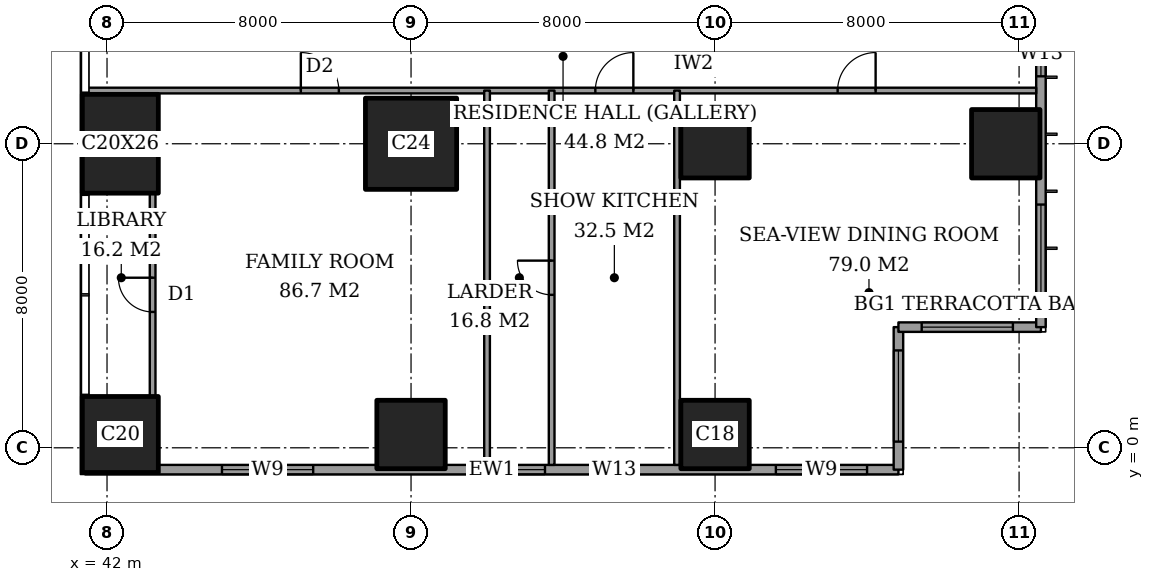
"""IFC4 building model, lengths in metres.
Left out: names, types, materials, properties, quantities, classifications, styles, units other than length and angle.
Written with IfcOpenShell. Run it as: python <this file> out.ifc"""

import sys

from ifc_helpers import new_model, si_unit, direction, frame, frame_2d, origin, origin_2d, place, context, subcontext, project, spatial, rectangle, extrude, element, fill, save


model = new_model("IFC4")
c1 = context("Model", 3, precision=1e-05, world=origin(), true_north=direction((0.0, 1.0)))
c2 = subcontext(c1, "Body", "Model", "MODEL_VIEW")
j1 = project(units=[si_unit("LENGTHUNIT", "METRE"), si_unit("PLANEANGLEUNIT", "RADIAN")], contexts=[c1])
p1 = place(None, origin())
s1 = spatial("IfcSite", under=j1, at=p1, CompositionType="ELEMENT")
p2 = place(p1, origin())
s2 = spatial("IfcBuilding", under=s1, at=p2, CompositionType="ELEMENT")
p3 = place(p2, frame((0.0, 0.0, 189.4)))
s3 = spatial("IfcBuildingStorey", under=s2, at=p3, CompositionType="ELEMENT", Elevation=189.4)
p4 = place(p3, frame((42.35, 0.35, 0.0), z_axis=(0.0, 0.0, 1.0), x_axis=(1.0, 0.0, 0.0)))
e1 = element("IfcColumn", 1, at=p4, inside=s3, PredefinedType="COLUMN", context=c2, shape_type="SweptSolid", body=[
    extrude(rectangle(XDim=2.0, YDim=2.0, at=origin_2d()), origin(), (0.0, 0.0, 1.0), 3.6),
])
p5 = place(p3, frame((42.35, 8.0, 0.0), z_axis=(0.0, 0.0, 1.0), x_axis=(1.0, 0.0, 0.0)))
e2 = element("IfcColumn", 2, at=p5, inside=s3, PredefinedType="COLUMN", context=c2, shape_type="SweptSolid", body=[
    extrude(rectangle(XDim=2.0, YDim=2.6, at=origin_2d()), origin(), (0.0, 0.0, 1.0), 3.6),
])
p6 = place(p3, frame((50.0, 0.35, 0.0), z_axis=(0.0, 0.0, 1.0), x_axis=(1.0, 0.0, 0.0)))
e3 = element("IfcColumn", 3, at=p6, inside=s3, PredefinedType="COLUMN", context=c2, shape_type="SweptSolid", body=[
    extrude(rectangle(XDim=1.8, YDim=1.8, at=origin_2d()), origin(), (0.0, 0.0, 1.0), 3.6),
])
p7 = place(p3, frame((50.0, 8.0, 0.0), z_axis=(0.0, 0.0, 1.0), x_axis=(1.0, 0.0, 0.0)))
e4 = element("IfcColumn", 4, at=p7, inside=s3, PredefinedType="COLUMN", context=c2, shape_type="SweptSolid", body=[
    extrude(rectangle(XDim=2.4, YDim=2.4, at=origin_2d()), origin(), (0.0, 0.0, 1.0), 3.6),
])
for number, where, z_axis, x_axis in (
    (5, (58.0, 0.35, 0.0), (0.0, 0.0, 1.0), (1.0, 0.0, 0.0)),
    (6, (58.0, 8.0, 0.0), (0.0, 0.0, 1.0), (1.0, 0.0, 0.0)),
    (7, (65.65, 8.0, 0.0), (0.0, 0.0, 1.0), (1.0, 0.0, 0.0)),
):
    element("IfcColumn", number, at=place(p3, frame(where, z_axis=z_axis, x_axis=x_axis)), inside=s3, PredefinedType="COLUMN", context=c2, shape_type="SweptSolid", body=[
        extrude(rectangle(XDim=1.8, YDim=1.8, at=origin_2d()), origin(), (0.0, 0.0, 1.0), 3.6),
    ])
p8 = place(p3, frame((41.425, -0.575, 0.0), z_axis=(0.0, 0.0, 1.0), x_axis=(1.0, 0.0, 0.0)))
e8 = element("IfcWall", 8, at=p8, inside=s3, PredefinedType="SOLIDWALL", context=c2, shape_type="SweptSolid", body=[
    extrude(rectangle(XDim=21.4, YDim=0.25, at=frame_2d((10.7, 0.0))), origin(), (0.0, 0.0, 1.0), 3.6),
])
p9 = place(p8, frame((3.6, 0.0, 0.2)))
e9 = element("IfcOpeningElement", 9, at=p9, cuts=e8, PredefinedType="OPENING", context=c2, shape_type="SweptSolid", body=[
    extrude(rectangle(XDim=2.4, YDim=2.4, at=frame_2d((1.2, 1.2))), frame((0.0, 0.135, 0.0), z_axis=(0.0, -1.0, 0.0), x_axis=(1.0, 0.0, 0.0)), (0.0, 0.0, 1.0), 0.27),
])
p10 = place(p8, frame((10.9, 0.0, 0.2)))
e10 = element("IfcOpeningElement", 10, at=p10, cuts=e8, PredefinedType="OPENING", context=c2, shape_type="SweptSolid", body=[
    extrude(rectangle(XDim=1.2, YDim=2.4, at=frame_2d((0.6, 1.2))), frame((0.0, 0.135, 0.0), z_axis=(0.0, -1.0, 0.0), x_axis=(1.0, 0.0, 0.0)), (0.0, 0.0, 1.0), 0.27),
])
p11 = place(p8, frame((13.325, 0.0, 0.2)))
e11 = element("IfcOpeningElement", 11, at=p11, cuts=e8, PredefinedType="OPENING", context=c2, shape_type="SweptSolid", body=[
    extrude(rectangle(XDim=1.2, YDim=2.4, at=frame_2d((0.6, 1.2))), frame((0.0, 0.135, 0.0), z_axis=(0.0, -1.0, 0.0), x_axis=(1.0, 0.0, 0.0)), (0.0, 0.0, 1.0), 0.27),
])
p12 = place(p8, frame((18.175, 0.0, 0.2)))
e12 = element("IfcOpeningElement", 12, at=p12, cuts=e8, PredefinedType="OPENING", context=c2, shape_type="SweptSolid", body=[
    extrude(rectangle(XDim=2.4, YDim=2.4, at=frame_2d((1.2, 1.2))), frame((0.0, 0.135, 0.0), z_axis=(0.0, -1.0, 0.0), x_axis=(1.0, 0.0, 0.0)), (0.0, 0.0, 1.0), 0.27),
])
p13 = place(p3, frame((62.825, -0.575, 0.0), z_axis=(0.0, 0.0, 1.0), x_axis=(0.0, 1.0, 0.0)))
e13 = element("IfcWall", 13, at=p13, inside=s3, PredefinedType="SOLIDWALL", context=c2, shape_type="SweptSolid", body=[
    extrude(rectangle(XDim=3.75, YDim=0.25, at=frame_2d((1.875, 0.0))), origin(), (0.0, 0.0, 1.0), 3.6),
])
p14 = place(p13, frame((0.738, 0.0, 0.2)))
e14 = element("IfcOpeningElement", 14, at=p14, cuts=e13, PredefinedType="OPENING", context=c2, shape_type="SweptSolid", body=[
    extrude(rectangle(XDim=2.4, YDim=2.4, at=frame_2d((1.2, 1.2))), frame((0.0, 0.135, 0.0), z_axis=(0.0, -1.0, 0.0), x_axis=(1.0, 0.0, 0.0)), (0.0, 0.0, 1.0), 0.27),
])
p15 = place(p3, frame((62.825, 3.175, 0.0), z_axis=(0.0, 0.0, 1.0), x_axis=(1.0, 0.0, 0.0)))
e15 = element("IfcWall", 15, at=p15, inside=s3, PredefinedType="SOLIDWALL", context=c2, shape_type="SweptSolid", body=[
    extrude(rectangle(XDim=3.75, YDim=0.25, at=frame_2d((1.875, 0.0))), origin(), (0.0, 0.0, 1.0), 3.6),
])
p16 = place(p15, frame((0.613, 0.0, 0.2)))
e16 = element("IfcOpeningElement", 16, at=p16, cuts=e15, PredefinedType="OPENING", context=c2, shape_type="SweptSolid", body=[
    extrude(rectangle(XDim=2.4, YDim=2.4, at=frame_2d((1.2, 1.2))), frame((0.0, 0.135, 0.0), z_axis=(0.0, -1.0, 0.0), x_axis=(1.0, 0.0, 0.0)), (0.0, 0.0, 1.0), 0.27),
])
p17 = place(p3, frame((66.575, 3.175, 0.0), z_axis=(0.0, 0.0, 1.0), x_axis=(0.0, 1.0, 0.0)))
e17 = element("IfcWall", 17, at=p17, inside=s3, PredefinedType="SOLIDWALL", context=c2, shape_type="SweptSolid", body=[
    extrude(rectangle(XDim=41.65, YDim=0.25, at=frame_2d((20.825, 0.0))), origin(), (0.0, 0.0, 1.0), 3.6),
])
p18 = place(p17, frame((0.825, 0.0, 0.2)))
e18 = element("IfcOpeningElement", 18, at=p18, cuts=e17, PredefinedType="OPENING", context=c2, shape_type="SweptSolid", body=[
    extrude(rectangle(XDim=2.4, YDim=2.4, at=frame_2d((1.2, 1.2))), frame((0.0, 0.135, 0.0), z_axis=(0.0, -1.0, 0.0), x_axis=(1.0, 0.0, 0.0)), (0.0, 0.0, 1.0), 0.27),
])
p19 = place(p17, frame((6.6, 0.0, 0.2)))
e19 = element("IfcOpeningElement", 19, at=p19, cuts=e17, PredefinedType="OPENING", context=c2, shape_type="SweptSolid", body=[
    extrude(rectangle(XDim=1.2, YDim=2.4, at=frame_2d((0.6, 1.2))), frame((0.0, 0.135, 0.0), z_axis=(0.0, -1.0, 0.0), x_axis=(1.0, 0.0, 0.0)), (0.0, 0.0, 1.0), 0.27),
])
p20 = place(p17, frame((8.775, 0.0, 0.2)))
e20 = element("IfcOpeningElement", 20, at=p20, cuts=e17, PredefinedType="OPENING", context=c2, shape_type="SweptSolid", body=[
    extrude(rectangle(XDim=2.4, YDim=2.4, at=frame_2d((1.2, 1.2))), frame((0.0, 0.135, 0.0), z_axis=(0.0, -1.0, 0.0), x_axis=(1.0, 0.0, 0.0)), (0.0, 0.0, 1.0), 0.27),
])
p21 = place(p17, frame((15.675, 0.0, 0.2)))
e21 = element("IfcOpeningElement", 21, at=p21, cuts=e17, PredefinedType="OPENING", context=c2, shape_type="SweptSolid", body=[
    extrude(rectangle(XDim=2.4, YDim=2.4, at=frame_2d((1.2, 1.2))), frame((0.0, 0.135, 0.0), z_axis=(0.0, -1.0, 0.0), x_axis=(1.0, 0.0, 0.0)), (0.0, 0.0, 1.0), 0.27),
])
p22 = place(p17, frame((23.575, 0.0, 0.2)))
e22 = element("IfcOpeningElement", 22, at=p22, cuts=e17, PredefinedType="OPENING", context=c2, shape_type="SweptSolid", body=[
    extrude(rectangle(XDim=2.4, YDim=2.4, at=frame_2d((1.2, 1.2))), frame((0.0, 0.135, 0.0), z_axis=(0.0, -1.0, 0.0), x_axis=(1.0, 0.0, 0.0)), (0.0, 0.0, 1.0), 0.27),
])
p23 = place(p17, frame((30.775, 0.0, 0.2)))
e23 = element("IfcOpeningElement", 23, at=p23, cuts=e17, PredefinedType="OPENING", context=c2, shape_type="SweptSolid", body=[
    extrude(rectangle(XDim=2.4, YDim=2.4, at=frame_2d((1.2, 1.2))), frame((0.0, 0.135, 0.0), z_axis=(0.0, -1.0, 0.0), x_axis=(1.0, 0.0, 0.0)), (0.0, 0.0, 1.0), 0.27),
])
p24 = place(p17, frame((34.55, 0.0, 0.2)))
e24 = element("IfcOpeningElement", 24, at=p24, cuts=e17, PredefinedType="OPENING", context=c2, shape_type="SweptSolid", body=[
    extrude(rectangle(XDim=1.2, YDim=2.4, at=frame_2d((0.6, 1.2))), frame((0.0, 0.135, 0.0), z_axis=(0.0, -1.0, 0.0), x_axis=(1.0, 0.0, 0.0)), (0.0, 0.0, 1.0), 0.27),
])
p25 = place(p17, frame((38.425, 0.0, 0.2)))
e25 = element("IfcOpeningElement", 25, at=p25, cuts=e17, PredefinedType="OPENING", context=c2, shape_type="SweptSolid", body=[
    extrude(rectangle(XDim=2.4, YDim=2.4, at=frame_2d((1.2, 1.2))), frame((0.0, 0.135, 0.0), z_axis=(0.0, -1.0, 0.0), x_axis=(1.0, 0.0, 0.0)), (0.0, 0.0, 1.0), 0.27),
])
p26 = place(p3, frame((41.439, 9.4, 0.0), z_axis=(0.0, 0.0, 1.0), x_axis=(1.0, 0.0, 0.0)))
e26 = element("IfcWall", 26, at=p26, inside=s3, PredefinedType="PARTITIONING", context=c2, shape_type="SweptSolid", body=[
    extrude(rectangle(XDim=25.011, YDim=0.15, at=frame_2d((12.505, 0.0))), origin(), (0.0, 0.0, 1.0), 3.35),
])
p27 = place(p26, frame((19.786, 0.0, 0.0)))
e27 = element("IfcOpeningElement", 27, at=p27, cuts=e26, PredefinedType="OPENING", context=c2, shape_type="SweptSolid", body=[
    extrude(rectangle(XDim=1.0, YDim=2.1, at=frame_2d((0.5, 1.05))), frame((0.0, 0.085, 0.0), z_axis=(0.0, -1.0, 0.0), x_axis=(1.0, 0.0, 0.0)), (0.0, 0.0, 1.0), 0.17),
])
p28 = place(p26, frame((13.411, 0.0, 0.0)))
e28 = element("IfcOpeningElement", 28, at=p28, cuts=e26, PredefinedType="OPENING", context=c2, shape_type="SweptSolid", body=[
    extrude(rectangle(XDim=1.0, YDim=2.1, at=frame_2d((0.5, 1.05))), frame((0.0, 0.085, 0.0), z_axis=(0.0, -1.0, 0.0), x_axis=(1.0, 0.0, 0.0)), (0.0, 0.0, 1.0), 0.17),
])
p29 = place(p26, frame((5.661, 0.0, 0.0)))
e29 = element("IfcOpeningElement", 29, at=p29, cuts=e26, PredefinedType="OPENING", context=c2, shape_type="SweptSolid", body=[
    extrude(rectangle(XDim=1.0, YDim=2.1, at=frame_2d((0.5, 1.05))), frame((0.0, 0.085, 0.0), z_axis=(0.0, -1.0, 0.0), x_axis=(1.0, 0.0, 0.0)), (0.0, 0.0, 1.0), 0.17),
])
p30 = place(p3, frame((43.2, 1.35, 0.0), z_axis=(0.0, 0.0, 1.0), x_axis=(0.0, 1.0, 0.0)))
e30 = element("IfcWall", 30, at=p30, inside=s3, PredefinedType="PARTITIONING", context=c2, shape_type="SweptSolid", body=[
    extrude(rectangle(XDim=5.35, YDim=0.15, at=frame_2d((2.675, 0.0))), origin(), (0.0, 0.0, 1.0), 3.35),
])
p31 = place(p30, frame((2.225, 0.0, 0.0)))
e31 = element("IfcOpeningElement", 31, at=p31, cuts=e30, PredefinedType="OPENING", context=c2, shape_type="SweptSolid", body=[
    extrude(rectangle(XDim=0.9, YDim=2.1, at=frame_2d((0.45, 1.05))), frame((0.0, 0.085, 0.0), z_axis=(0.0, -1.0, 0.0), x_axis=(1.0, 0.0, 0.0)), (0.0, 0.0, 1.0), 0.17),
])
p32 = place(p3, frame((52.0, -0.45, 0.0), z_axis=(0.0, 0.0, 1.0), x_axis=(0.0, 1.0, 0.0)))
e32 = element("IfcWall", 32, at=p32, inside=s3, PredefinedType="PARTITIONING", context=c2, shape_type="SweptSolid", body=[
    extrude(rectangle(XDim=9.85, YDim=0.15, at=frame_2d((4.925, 0.0))), origin(), (0.0, 0.0, 1.0), 3.35),
])
p33 = place(p3, frame((53.7, -0.45, 0.0), z_axis=(0.0, 0.0, 1.0), x_axis=(0.0, 1.0, 0.0)))
e33 = element("IfcWall", 33, at=p33, inside=s3, PredefinedType="PARTITIONING", context=c2, shape_type="SweptSolid", body=[
    extrude(rectangle(XDim=9.85, YDim=0.15, at=frame_2d((4.925, 0.0))), origin(), (0.0, 0.0, 1.0), 3.35),
])
p34 = place(p33, frame((4.475, 0.0, 0.0)))
e34 = element("IfcOpeningElement", 34, at=p34, cuts=e33, PredefinedType="OPENING", context=c2, shape_type="SweptSolid", body=[
    extrude(rectangle(XDim=0.9, YDim=2.1, at=frame_2d((0.45, 1.05))), frame((0.0, 0.085, 0.0), z_axis=(0.0, -1.0, 0.0), x_axis=(1.0, 0.0, 0.0)), (0.0, 0.0, 1.0), 0.17),
])
p35 = place(p3, frame((57.0, -0.45, 0.0), z_axis=(0.0, 0.0, 1.0), x_axis=(0.0, 1.0, 0.0)))
e35 = element("IfcWall", 35, at=p35, inside=s3, PredefinedType="PARTITIONING", context=c2, shape_type="SweptSolid", body=[
    extrude(rectangle(XDim=9.85, YDim=0.15, at=frame_2d((4.925, 0.0))), origin(), (0.0, 0.0, 1.0), 3.35),
])
p36 = place(p9, origin())
e36 = element("IfcWindow", 36, at=p36, inside=s3, PartitioningType="SINGLE_PANEL", PredefinedType="WINDOW", context=c2, shape_type="SweptSolid", body=[
    extrude(rectangle(XDim=2.4, YDim=2.4, at=frame_2d((1.2, 1.2))), frame((0.0, 0.03, 0.0), z_axis=(0.0, -1.0, 0.0), x_axis=(1.0, 0.0, 0.0)), (0.0, 0.0, 1.0), 0.06),
])
fill(e9, e36)
p37 = place(p10, origin())
e37 = element("IfcWindow", 37, at=p37, inside=s3, PartitioningType="SINGLE_PANEL", PredefinedType="WINDOW", context=c2, shape_type="SweptSolid", body=[
    extrude(rectangle(XDim=1.2, YDim=2.4, at=frame_2d((0.6, 1.2))), frame((0.0, 0.03, 0.0), z_axis=(0.0, -1.0, 0.0), x_axis=(1.0, 0.0, 0.0)), (0.0, 0.0, 1.0), 0.06),
])
fill(e10, e37)
p38 = place(p11, origin())
e38 = element("IfcWindow", 38, at=p38, inside=s3, PartitioningType="SINGLE_PANEL", PredefinedType="WINDOW", context=c2, shape_type="SweptSolid", body=[
    extrude(rectangle(XDim=1.2, YDim=2.4, at=frame_2d((0.6, 1.2))), frame((0.0, 0.03, 0.0), z_axis=(0.0, -1.0, 0.0), x_axis=(1.0, 0.0, 0.0)), (0.0, 0.0, 1.0), 0.06),
])
fill(e11, e38)
p39 = place(p12, origin())
e39 = element("IfcWindow", 39, at=p39, inside=s3, PartitioningType="SINGLE_PANEL", PredefinedType="WINDOW", context=c2, shape_type="SweptSolid", body=[
    extrude(rectangle(XDim=2.4, YDim=2.4, at=frame_2d((1.2, 1.2))), frame((0.0, 0.03, 0.0), z_axis=(0.0, -1.0, 0.0), x_axis=(1.0, 0.0, 0.0)), (0.0, 0.0, 1.0), 0.06),
])
fill(e12, e39)
p40 = place(p14, origin())
e40 = element("IfcWindow", 40, at=p40, inside=s3, PartitioningType="SINGLE_PANEL", PredefinedType="WINDOW", context=c2, shape_type="SweptSolid", body=[
    extrude(rectangle(XDim=2.4, YDim=2.4, at=frame_2d((1.2, 1.2))), frame((0.0, 0.03, 0.0), z_axis=(0.0, -1.0, 0.0), x_axis=(1.0, 0.0, 0.0)), (0.0, 0.0, 1.0), 0.06),
])
fill(e14, e40)
p41 = place(p16, origin())
e41 = element("IfcWindow", 41, at=p41, inside=s3, PartitioningType="SINGLE_PANEL", PredefinedType="WINDOW", context=c2, shape_type="SweptSolid", body=[
    extrude(rectangle(XDim=2.4, YDim=2.4, at=frame_2d((1.2, 1.2))), frame((0.0, 0.03, 0.0), z_axis=(0.0, -1.0, 0.0), x_axis=(1.0, 0.0, 0.0)), (0.0, 0.0, 1.0), 0.06),
])
fill(e16, e41)
p42 = place(p18, origin())
e42 = element("IfcWindow", 42, at=p42, inside=s3, PartitioningType="SINGLE_PANEL", PredefinedType="WINDOW", context=c2, shape_type="SweptSolid", body=[
    extrude(rectangle(XDim=2.4, YDim=2.4, at=frame_2d((1.2, 1.2))), frame((0.0, 0.03, 0.0), z_axis=(0.0, -1.0, 0.0), x_axis=(1.0, 0.0, 0.0)), (0.0, 0.0, 1.0), 0.06),
])
fill(e18, e42)
p43 = place(p19, origin())
e43 = element("IfcWindow", 43, at=p43, inside=s3, PartitioningType="SINGLE_PANEL", PredefinedType="WINDOW", context=c2, shape_type="SweptSolid", body=[
    extrude(rectangle(XDim=1.2, YDim=2.4, at=frame_2d((0.6, 1.2))), frame((0.0, 0.03, 0.0), z_axis=(0.0, -1.0, 0.0), x_axis=(1.0, 0.0, 0.0)), (0.0, 0.0, 1.0), 0.06),
])
fill(e19, e43)
p44 = place(p27, origin())
e44 = element("IfcDoor", 44, at=p44, inside=s3, OperationType="SINGLE_SWING_LEFT", PredefinedType="DOOR", context=c2, shape_type="SweptSolid", body=[
    extrude(rectangle(XDim=1.0, YDim=2.1, at=frame_2d((0.5, 1.05))), frame((0.0, 0.025, 0.0), z_axis=(0.0, -1.0, 0.0), x_axis=(1.0, 0.0, 0.0)), (0.0, 0.0, 1.0), 0.05),
])
fill(e27, e44)
p45 = place(p28, origin())
e45 = element("IfcDoor", 45, at=p45, inside=s3, OperationType="SINGLE_SWING_LEFT", PredefinedType="DOOR", context=c2, shape_type="SweptSolid", body=[
    extrude(rectangle(XDim=1.0, YDim=2.1, at=frame_2d((0.5, 1.05))), frame((0.0, 0.025, 0.0), z_axis=(0.0, -1.0, 0.0), x_axis=(1.0, 0.0, 0.0)), (0.0, 0.0, 1.0), 0.05),
])
fill(e28, e45)
p46 = place(p34, origin())
e46 = element("IfcDoor", 46, at=p46, inside=s3, OperationType="SINGLE_SWING_LEFT", PredefinedType="DOOR", context=c2, shape_type="SweptSolid", body=[
    extrude(rectangle(XDim=0.9, YDim=2.1, at=frame_2d((0.45, 1.05))), frame((0.0, 0.025, 0.0), z_axis=(0.0, -1.0, 0.0), x_axis=(1.0, 0.0, 0.0)), (0.0, 0.0, 1.0), 0.05),
])
fill(e34, e46)
p47 = place(p29, origin())
e47 = element("IfcDoor", 47, at=p47, inside=s3, OperationType="SINGLE_SWING_RIGHT", PredefinedType="DOOR", context=c2, shape_type="SweptSolid", body=[
    extrude(rectangle(XDim=1.0, YDim=2.1, at=frame_2d((0.5, 1.05))), frame((0.0, 0.025, 0.0), z_axis=(0.0, -1.0, 0.0), x_axis=(1.0, 0.0, 0.0)), (0.0, 0.0, 1.0), 0.05),
])
fill(e29, e47)
p48 = place(p31, origin())
e48 = element("IfcDoor", 48, at=p48, inside=s3, OperationType="SINGLE_SWING_LEFT", PredefinedType="DOOR", context=c2, shape_type="SweptSolid", body=[
    extrude(rectangle(XDim=0.9, YDim=2.1, at=frame_2d((0.45, 1.05))), frame((0.0, 0.025, 0.0), z_axis=(0.0, -1.0, 0.0), x_axis=(1.0, 0.0, 0.0)), (0.0, 0.0, 1.0), 0.05),
])
fill(e31, e48)
save(model, sys.argv[1])
